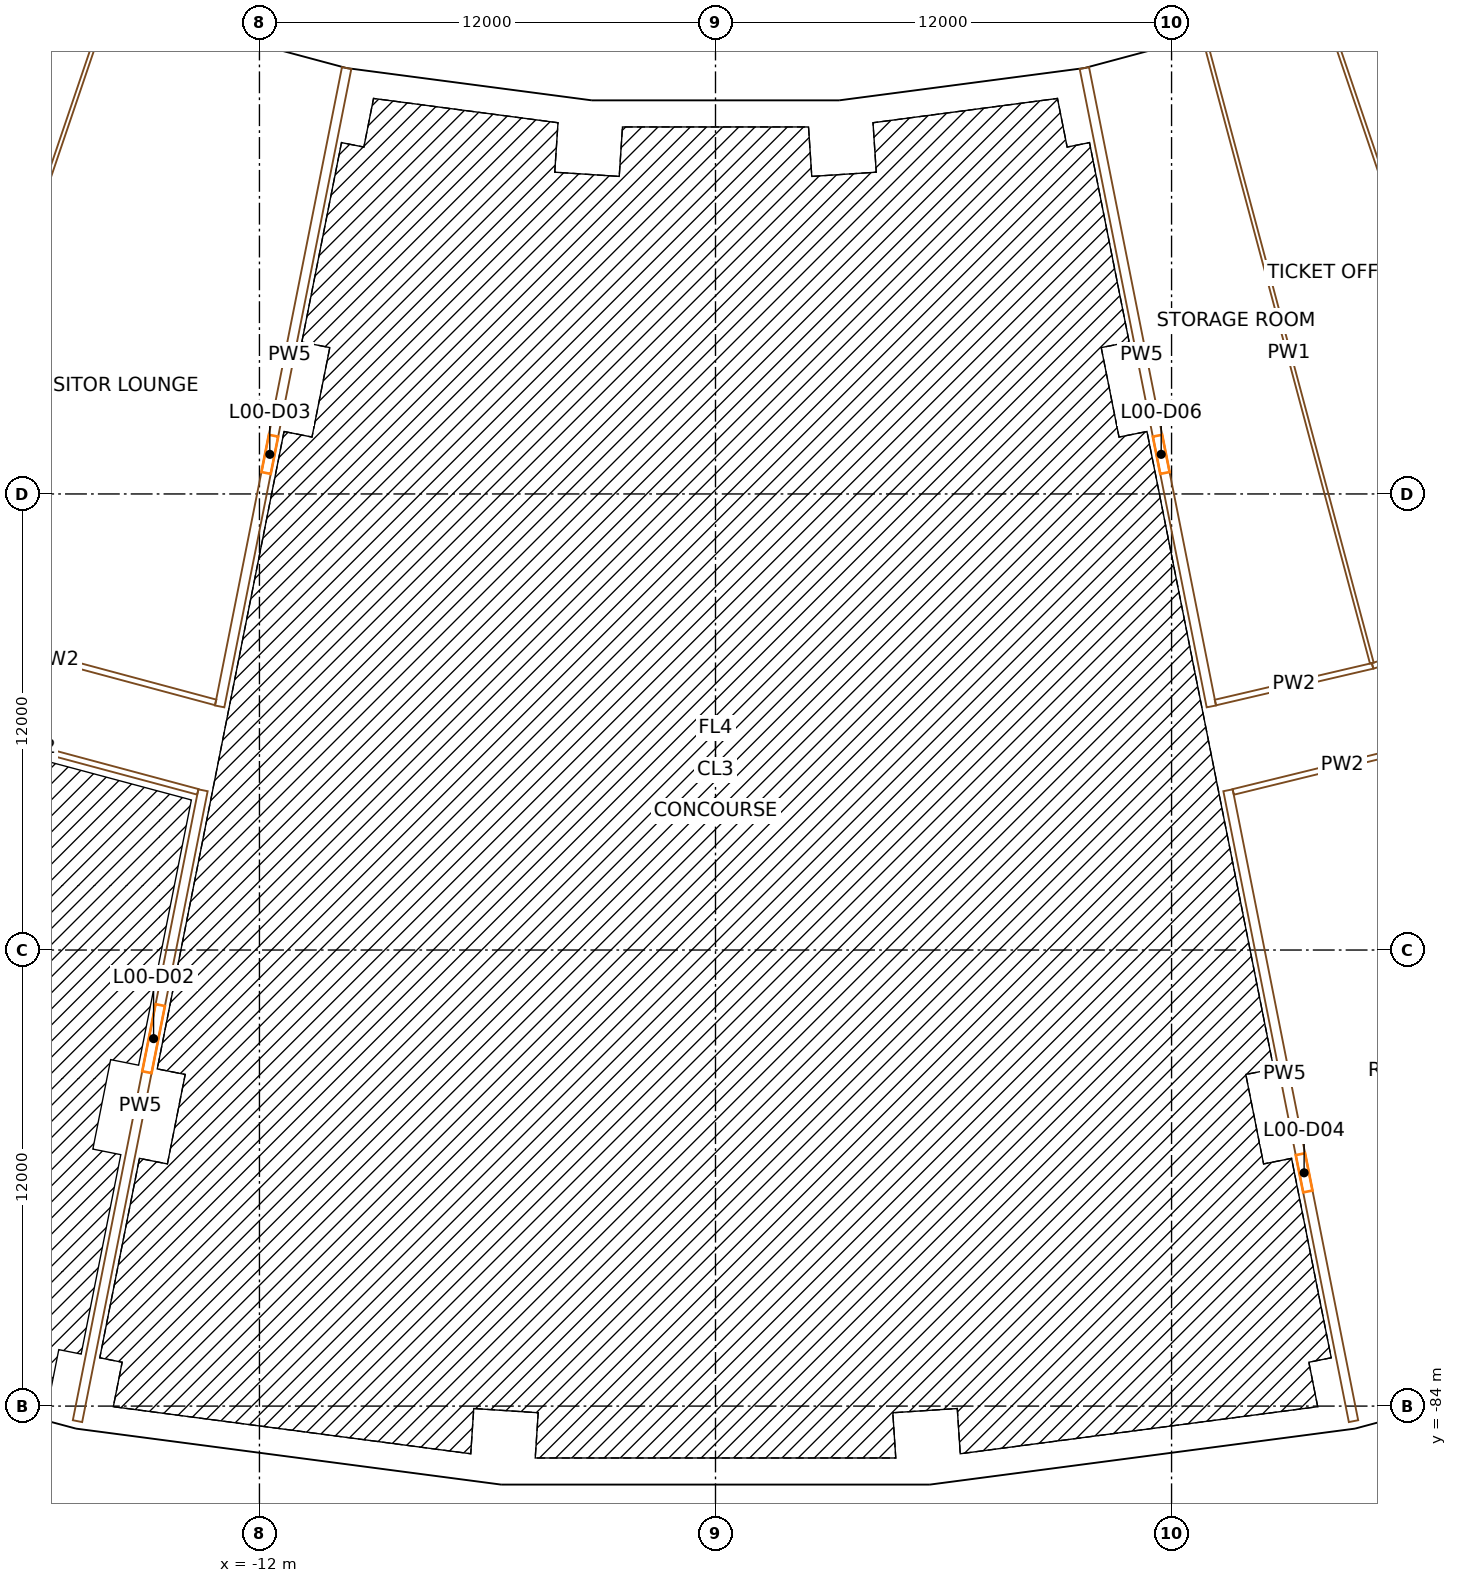
"""IFC4 building model, lengths in metres.
Left out: names, types, materials, properties, quantities, classifications, styles, units other than length and angle.
Written with IfcOpenShell. Run it as: python <this file> out.ifc"""

import sys

from ifc_helpers import new_model, si_unit, direction, frame, frame_2d, origin, origin_2d, place, context, subcontext, project, spatial, rectangle, extrude, element, fill, save


model = new_model("IFC4")
c1 = context("Model", 3, precision=1e-05, world=origin(), true_north=direction((0.0, 1.0)))
c2 = subcontext(c1, "Body", "Model", "MODEL_VIEW")
j1 = project(units=[si_unit("LENGTHUNIT", "METRE"), si_unit("PLANEANGLEUNIT", "RADIAN")], contexts=[c1])
p1 = place(None, origin())
s1 = spatial("IfcSite", under=j1, at=p1, CompositionType="ELEMENT")
p2 = place(p1, origin())
s2 = spatial("IfcBuilding", under=s1, at=p2, CompositionType="ELEMENT")
p3 = place(p2, origin())
s3 = spatial("IfcBuildingStorey", under=s2, at=p3, CompositionType="ELEMENT", Elevation=0.0)
for number, where, z_axis, x_axis in (
    (1, (-16.313, -48.057, -0.4), (0.0, 0.0, 1.0), (0.947, -0.321, 0.0)),
    (2, (-9.901, -49.775, -0.4), (0.0, 0.0, 1.0), (0.981, -0.195, 0.0)),
):
    element("IfcColumn", number, at=place(p3, frame(where, z_axis=z_axis, x_axis=x_axis)), inside=s3, PredefinedType="COLUMN", context=c2, shape_type="SweptSolid", body=[
        extrude(rectangle(XDim=1.1, YDim=1.3, at=origin_2d()), origin(), (0.0, 0.0, 1.0), 9.4),
    ])
for number, where, z_axis, x_axis in (
    (3, (-11.364, -57.131, -0.4), (0.0, 0.0, 1.0), (0.981, -0.195, 0.0)),
    (4, (-15.168, -76.256, -0.4), (0.0, 0.0, 1.0), (0.981, -0.195, 0.0)),
):
    element("IfcColumn", number, at=place(p3, frame(where, z_axis=z_axis, x_axis=x_axis)), inside=s3, PredefinedType="COLUMN", context=c2, shape_type="SweptSolid", body=[
        extrude(rectangle(XDim=1.4, YDim=1.8, at=origin_2d()), origin(), (0.0, 0.0, 1.0), 9.4),
    ])
for number, where, z_axis, x_axis in (
    (5, (-16.631, -83.612, -0.4), (0.0, 0.0, 1.0), (0.981, -0.195, 0.0)),
    (6, (-3.319, -50.641, -0.4), (0.0, 0.0, 1.0), (0.998, -0.065, 0.0)),
):
    element("IfcColumn", number, at=place(p3, frame(where, z_axis=z_axis, x_axis=x_axis)), inside=s3, PredefinedType="COLUMN", context=c2, shape_type="SweptSolid", body=[
        extrude(rectangle(XDim=1.1, YDim=1.3, at=origin_2d()), origin(), (0.0, 0.0, 1.0), 9.4),
    ])
for number, where, z_axis, x_axis in (
    (7, (-3.81, -58.125, -0.4), (0.0, 0.0, 1.0), (0.998, -0.065, 0.0)),
    (8, (-5.085, -77.583, -0.4), (0.0, 0.0, 1.0), (0.998, -0.065, 0.0)),
):
    element("IfcColumn", number, at=place(p3, frame(where, z_axis=z_axis, x_axis=x_axis)), inside=s3, PredefinedType="COLUMN", context=c2, shape_type="SweptSolid", body=[
        extrude(rectangle(XDim=1.4, YDim=1.8, at=origin_2d()), origin(), (0.0, 0.0, 1.0), 9.4),
    ])
for number, where, z_axis, x_axis in (
    (9, (-5.576, -85.067, -0.4), (0.0, 0.0, 1.0), (0.998, -0.065, 0.0)),
    (10, (3.319, -50.641, -0.4), (0.0, 0.0, 1.0), (0.998, 0.065, 0.0)),
):
    element("IfcColumn", number, at=place(p3, frame(where, z_axis=z_axis, x_axis=x_axis)), inside=s3, PredefinedType="COLUMN", context=c2, shape_type="SweptSolid", body=[
        extrude(rectangle(XDim=1.1, YDim=1.3, at=origin_2d()), origin(), (0.0, 0.0, 1.0), 9.4),
    ])
for number, where, z_axis, x_axis in (
    (11, (3.81, -58.125, -0.4), (0.0, 0.0, 1.0), (0.998, 0.065, 0.0)),
    (12, (5.085, -77.583, -0.4), (0.0, 0.0, 1.0), (0.998, 0.065, 0.0)),
):
    element("IfcColumn", number, at=place(p3, frame(where, z_axis=z_axis, x_axis=x_axis)), inside=s3, PredefinedType="COLUMN", context=c2, shape_type="SweptSolid", body=[
        extrude(rectangle(XDim=1.4, YDim=1.8, at=origin_2d()), origin(), (0.0, 0.0, 1.0), 9.4),
    ])
for number, where, z_axis, x_axis in (
    (13, (5.576, -85.067, -0.4), (0.0, 0.0, 1.0), (0.998, 0.065, 0.0)),
    (14, (9.901, -49.775, -0.4), (0.0, 0.0, 1.0), (0.981, 0.195, 0.0)),
):
    element("IfcColumn", number, at=place(p3, frame(where, z_axis=z_axis, x_axis=x_axis)), inside=s3, PredefinedType="COLUMN", context=c2, shape_type="SweptSolid", body=[
        extrude(rectangle(XDim=1.1, YDim=1.3, at=origin_2d()), origin(), (0.0, 0.0, 1.0), 9.4),
    ])
for number, where, z_axis, x_axis in (
    (15, (11.364, -57.131, -0.4), (0.0, 0.0, 1.0), (0.981, 0.195, 0.0)),
    (16, (15.168, -76.256, -0.4), (0.0, 0.0, 1.0), (0.981, 0.195, 0.0)),
):
    element("IfcColumn", number, at=place(p3, frame(where, z_axis=z_axis, x_axis=x_axis)), inside=s3, PredefinedType="COLUMN", context=c2, shape_type="SweptSolid", body=[
        extrude(rectangle(XDim=1.4, YDim=1.8, at=origin_2d()), origin(), (0.0, 0.0, 1.0), 9.4),
    ])
for number, where, z_axis, x_axis in (
    (17, (16.631, -83.612, -0.4), (0.0, 0.0, 1.0), (0.981, 0.195, 0.0)),
    (18, (16.313, -48.057, -0.4), (0.0, 0.0, 1.0), (0.947, 0.321, 0.0)),
):
    element("IfcColumn", number, at=place(p3, frame(where, z_axis=z_axis, x_axis=x_axis)), inside=s3, PredefinedType="COLUMN", context=c2, shape_type="SweptSolid", body=[
        extrude(rectangle(XDim=1.1, YDim=1.3, at=origin_2d()), origin(), (0.0, 0.0, 1.0), 9.4),
    ])
p4 = place(p3, frame((-13.078, -84.935, 0.0), z_axis=(0.0, 0.0, 1.0), x_axis=(0.99144147491, -0.130551912392, 0.0)))
e19 = element("IfcWall", 19, at=p4, inside=s3, PredefinedType="SOLIDWALL", context=c2, shape_type="SweptSolid", body=[
    extrude(rectangle(XDim=3.761, YDim=0.3, at=frame_2d((1.88, 0.0))), origin(), (0.0, 0.0, 1.0), 7.7),
])
p5 = place(p4, frame((0.68, 0.0, 0.0)))
e20 = element("IfcOpeningElement", 20, at=p5, cuts=e19, PredefinedType="OPENING", context=c2, shape_type="SweptSolid", body=[
    extrude(rectangle(XDim=2.4, YDim=3.0, at=frame_2d((1.2, 1.5))), frame((0.0, 0.16, 0.0), z_axis=(0.0, -1.0, 0.0), x_axis=(1.0, 0.0, 0.0)), (0.0, 0.0, 1.0), 0.32),
])
p6 = place(p3, frame((-1.88, -85.915, 0.0), z_axis=(0.0, 0.0, 1.0), x_axis=(1.0, 0.0, 0.0)))
e21 = element("IfcWall", 21, at=p6, inside=s3, PredefinedType="SOLIDWALL", context=c2, shape_type="SweptSolid", body=[
    extrude(rectangle(XDim=3.761, YDim=0.3, at=frame_2d((1.88, 0.0))), origin(), (0.0, 0.0, 1.0), 7.7),
])
p7 = place(p6, frame((0.68, 0.0, 0.0)))
e22 = element("IfcOpeningElement", 22, at=p7, cuts=e21, PredefinedType="OPENING", context=c2, shape_type="SweptSolid", body=[
    extrude(rectangle(XDim=2.4, YDim=3.0, at=frame_2d((1.2, 1.5))), frame((0.0, 0.16, 0.0), z_axis=(0.0, -1.0, 0.0), x_axis=(1.0, 0.0, 0.0)), (0.0, 0.0, 1.0), 0.32),
])
p8 = place(p3, frame((9.35, -85.426, 0.0), z_axis=(0.0, 0.0, 1.0), x_axis=(0.99144147491, 0.130551912392, 0.0)))
e23 = element("IfcWall", 23, at=p8, inside=s3, PredefinedType="SOLIDWALL", context=c2, shape_type="SweptSolid", body=[
    extrude(rectangle(XDim=3.761, YDim=0.3, at=frame_2d((1.88, 0.0))), origin(), (0.0, 0.0, 1.0), 7.7),
])
p9 = place(p8, frame((0.68, 0.0, 0.0)))
e24 = element("IfcOpeningElement", 24, at=p9, cuts=e23, PredefinedType="OPENING", context=c2, shape_type="SweptSolid", body=[
    extrude(rectangle(XDim=2.4, YDim=3.0, at=frame_2d((1.2, 1.5))), frame((0.0, 0.16, 0.0), z_axis=(0.0, -1.0, 0.0), x_axis=(1.0, 0.0, 0.0)), (0.0, 0.0, 1.0), 0.32),
])
p10 = place(p3, frame((-7.575, -49.226, 0.0), z_axis=(0.0, 0.0, 1.0), x_axis=(0.991440882539, -0.130556410914, 0.0)))
e25 = element("IfcWall", 25, at=p10, inside=s3, PredefinedType="SOLIDWALL", context=c2, shape_type="SweptSolid", body=[
    extrude(rectangle(XDim=2.169, YDim=0.3, at=frame_2d((1.084, 0.0))), origin(), (0.0, 0.0, 1.0), 7.7),
])
p11 = place(p10, frame((0.285, 0.0, 0.0)))
e26 = element("IfcOpeningElement", 26, at=p11, cuts=e25, PredefinedType="OPENING", context=c2, shape_type="SweptSolid", body=[
    extrude(rectangle(XDim=1.6, YDim=3.0, at=frame_2d((0.8, 1.5))), frame((0.0, 0.16, 0.0), z_axis=(0.0, -1.0, 0.0), x_axis=(1.0, 0.0, 0.0)), (0.0, 0.0, 1.0), 0.32),
])
p12 = place(p3, frame((-1.085, -49.793, 0.0), z_axis=(0.0, 0.0, 1.0), x_axis=(1.0, 0.0, 0.0)))
e27 = element("IfcWall", 27, at=p12, inside=s3, PredefinedType="SOLIDWALL", context=c2, shape_type="SweptSolid", body=[
    extrude(rectangle(XDim=2.169, YDim=0.3, at=frame_2d((1.085, 0.0))), origin(), (0.0, 0.0, 1.0), 7.7),
])
p13 = place(p12, frame((0.285, 0.0, 0.0)))
e28 = element("IfcOpeningElement", 28, at=p13, cuts=e27, PredefinedType="OPENING", context=c2, shape_type="SweptSolid", body=[
    extrude(rectangle(XDim=1.6, YDim=3.0, at=frame_2d((0.8, 1.5))), frame((0.0, 0.16, 0.0), z_axis=(0.0, -1.0, 0.0), x_axis=(1.0, 0.0, 0.0)), (0.0, 0.0, 1.0), 0.32),
])
p14 = place(p3, frame((5.424, -49.509, 0.0), z_axis=(0.0, 0.0, 1.0), x_axis=(0.991440882539, 0.130556410914, 0.0)))
e29 = element("IfcWall", 29, at=p14, inside=s3, PredefinedType="SOLIDWALL", context=c2, shape_type="SweptSolid", body=[
    extrude(rectangle(XDim=2.169, YDim=0.3, at=frame_2d((1.084, 0.0))), origin(), (0.0, 0.0, 1.0), 7.7),
])
p15 = place(p14, frame((0.285, 0.0, 0.0)))
e30 = element("IfcOpeningElement", 30, at=p15, cuts=e29, PredefinedType="OPENING", context=c2, shape_type="SweptSolid", body=[
    extrude(rectangle(XDim=1.6, YDim=3.0, at=frame_2d((0.8, 1.5))), frame((0.0, 0.16, 0.0), z_axis=(0.0, -1.0, 0.0), x_axis=(1.0, 0.0, 0.0)), (0.0, 0.0, 1.0), 0.32),
])
p16 = place(p3, frame((-22.244, -65.528, 0.0), z_axis=(0.0, 0.0, 1.0), x_axis=(0.965928763412, -0.258808083362, 0.0)))
e31 = element("IfcWall", 31, at=p16, inside=s3, PredefinedType="PARTITIONING", context=c2, shape_type="SweptSolid", body=[
    extrude(rectangle(XDim=8.927, YDim=0.15, at=frame_2d((4.463, 0.0))), origin(), (0.0, 0.0, 1.0), 7.6),
])
p17 = place(p3, frame((-21.472, -63.255, 0.0), z_axis=(0.0, 0.0, 1.0), x_axis=(0.96592325157, -0.258828653894, 0.0)))
e32 = element("IfcWall", 32, at=p17, inside=s3, PredefinedType="PARTITIONING", context=c2, shape_type="SweptSolid", body=[
    extrude(rectangle(XDim=8.613, YDim=0.15, at=frame_2d((4.306, 0.0))), origin(), (0.0, 0.0, 1.0), 7.6),
])
p18 = place(p3, frame((-16.136, -47.536, 0.0), z_axis=(0.0, 0.0, 1.0), x_axis=(-0.321439713462, -0.946930045256, 0.0)))
e33 = element("IfcWall", 33, at=p18, inside=s3, PredefinedType="PARTITIONING", context=c2, shape_type="SweptSolid", body=[
    extrude(rectangle(XDim=16.525, YDim=0.1, at=frame_2d((8.262, 0.0))), origin(), (0.0, 0.0, 1.0), 7.6),
])
p19 = place(p3, frame((-16.787, -84.396, 0.0), z_axis=(0.0, 0.0, 1.0), x_axis=(0.195086842272, 0.980785972561, 0.0)))
e34 = element("IfcWall", 34, at=p19, inside=s3, PredefinedType="PARTITIONING", context=c2, shape_type="SweptSolid", body=[
    extrude(rectangle(XDim=16.925, YDim=0.25, at=frame_2d((8.462, 0.0))), origin(), (0.0, 0.0, 1.0), 7.6),
])
p20 = place(p19, frame((9.362, 0.0, 0.0)))
e35 = element("IfcOpeningElement", 35, at=p20, cuts=e34, PredefinedType="OPENING", context=c2, shape_type="SweptSolid", body=[
    extrude(rectangle(XDim=1.8, YDim=2.1, at=frame_2d((0.9, 1.05))), frame((0.0, 0.135, 0.0), z_axis=(0.0, -1.0, 0.0), x_axis=(1.0, 0.0, 0.0)), (0.0, 0.0, 1.0), 0.27),
])
p21 = place(p3, frame((-13.047, -65.59, 0.0), z_axis=(0.0, 0.0, 1.0), x_axis=(0.195085176221, 0.980786303952, 0.0)))
e36 = element("IfcWall", 36, at=p21, inside=s3, PredefinedType="PARTITIONING", context=c2, shape_type="SweptSolid", body=[
    extrude(rectangle(XDim=17.125, YDim=0.25, at=frame_2d((8.562, 0.0))), origin(), (0.0, 0.0, 1.0), 7.6),
])
p22 = place(p21, frame((6.262, 0.0, 0.0)))
e37 = element("IfcOpeningElement", 37, at=p22, cuts=e36, PredefinedType="OPENING", context=c2, shape_type="SweptSolid", body=[
    extrude(rectangle(XDim=1.0, YDim=2.1, at=frame_2d((0.5, 1.05))), frame((0.0, 0.135, 0.0), z_axis=(0.0, -1.0, 0.0), x_axis=(1.0, 0.0, 0.0)), (0.0, 0.0, 1.0), 0.27),
])
p23 = place(p3, frame((9.706, -48.794, 0.0), z_axis=(0.0, 0.0, 1.0), x_axis=(0.195085176221, -0.980786303952, 0.0)))
e38 = element("IfcWall", 38, at=p23, inside=s3, PredefinedType="PARTITIONING", context=c2, shape_type="SweptSolid", body=[
    extrude(rectangle(XDim=17.125, YDim=0.25, at=frame_2d((8.562, 0.0))), origin(), (0.0, 0.0, 1.0), 7.6),
])
p24 = place(p23, frame((9.863, 0.0, 0.0)))
e39 = element("IfcOpeningElement", 39, at=p24, cuts=e38, PredefinedType="OPENING", context=c2, shape_type="SweptSolid", body=[
    extrude(rectangle(XDim=1.0, YDim=2.1, at=frame_2d((0.5, 1.05))), frame((0.0, 0.135, 0.0), z_axis=(0.0, -1.0, 0.0), x_axis=(1.0, 0.0, 0.0)), (0.0, 0.0, 1.0), 0.27),
])
p25 = place(p3, frame((12.9, -48.145, 0.0), z_axis=(0.0, 0.0, 1.0), x_axis=(0.258824516405, -0.965924360241, 0.0)))
e40 = element("IfcWall", 40, at=p25, inside=s3, PredefinedType="PARTITIONING", context=c2, shape_type="SweptSolid", body=[
    extrude(rectangle(XDim=16.882, YDim=0.1, at=frame_2d((8.441, 0.0))), origin(), (0.0, 0.0, 1.0), 7.6),
])
p26 = place(p3, frame((13.154, -65.488, 0.0), z_axis=(0.0, 0.0, 1.0), x_axis=(0.973881908434, 0.227055121998, 0.0)))
e41 = element("IfcWall", 41, at=p26, inside=s3, PredefinedType="PARTITIONING", context=c2, shape_type="SweptSolid", body=[
    extrude(rectangle(XDim=4.246, YDim=0.15, at=frame_2d((2.123, 0.0))), origin(), (0.0, 0.0, 1.0), 7.6),
])
p27 = place(p3, frame((13.486, -67.797, 0.0), z_axis=(0.0, 0.0, 1.0), x_axis=(0.195086842272, -0.980785972561, 0.0)))
e42 = element("IfcWall", 42, at=p27, inside=s3, PredefinedType="PARTITIONING", context=c2, shape_type="SweptSolid", body=[
    extrude(rectangle(XDim=16.925, YDim=0.25, at=frame_2d((8.462, 0.0))), origin(), (0.0, 0.0, 1.0), 7.6),
])
p28 = place(p27, frame((9.762, 0.0, 0.0)))
e43 = element("IfcOpeningElement", 43, at=p28, cuts=e42, PredefinedType="OPENING", context=c2, shape_type="SweptSolid", body=[
    extrude(rectangle(XDim=1.0, YDim=2.1, at=frame_2d((0.5, 1.05))), frame((0.0, 0.135, 0.0), z_axis=(0.0, -1.0, 0.0), x_axis=(1.0, 0.0, 0.0)), (0.0, 0.0, 1.0), 0.27),
])
p29 = place(p3, frame((13.622, -67.841, 0.0), z_axis=(0.0, 0.0, 1.0), x_axis=(0.971337396257, 0.237704990762, 0.0)))
e44 = element("IfcWall", 44, at=p29, inside=s3, PredefinedType="PARTITIONING", context=c2, shape_type="SweptSolid", body=[
    extrude(rectangle(XDim=5.914, YDim=0.15, at=frame_2d((2.957, 0.0))), origin(), (0.0, 0.0, 1.0), 7.6),
])
p30 = place(p3, frame((16.136, -47.536, 0.0), z_axis=(0.0, 0.0, 1.0), x_axis=(0.321439713462, -0.946930045256, 0.0)))
e45 = element("IfcWall", 45, at=p30, inside=s3, PredefinedType="PARTITIONING", context=c2, shape_type="SweptSolid", body=[
    extrude(rectangle(XDim=16.525, YDim=0.1, at=frame_2d((8.262, 0.0))), origin(), (0.0, 0.0, 1.0), 7.6),
])
p31 = place(p3, frame((17.289, -64.524, 0.0), z_axis=(0.0, 0.0, 1.0), x_axis=(0.956933231095, 0.290308097072, 0.0)))
e46 = element("IfcWall", 46, at=p31, inside=s3, PredefinedType="PARTITIONING", context=c2, shape_type="SweptSolid", body=[
    extrude(rectangle(XDim=4.371, YDim=0.15, at=frame_2d((2.186, 0.0))), origin(), (0.0, 0.0, 1.0), 7.6),
])
p32 = place(p31, frame((1.686, 0.0, 0.0)))
e47 = element("IfcOpeningElement", 47, at=p32, cuts=e46, PredefinedType="OPENING", context=c2, shape_type="SweptSolid", body=[
    extrude(rectangle(XDim=1.0, YDim=2.1, at=frame_2d((0.5, 1.05))), frame((0.0, 0.085, 0.0), z_axis=(0.0, -1.0, 0.0), x_axis=(1.0, 0.0, 0.0)), (0.0, 0.0, 1.0), 0.17),
])
p33 = place(p5, origin())
e48 = element("IfcDoor", 48, at=p33, inside=s3, OperationType="DOUBLE_DOOR_DOUBLE_SWING", PredefinedType="DOOR", context=c2, shape_type="SweptSolid", body=[
    extrude(rectangle(XDim=2.4, YDim=3.0, at=frame_2d((1.2, 1.5))), frame((0.0, 0.025, 0.0), z_axis=(0.0, -1.0, 0.0), x_axis=(1.0, 0.0, 0.0)), (0.0, 0.0, 1.0), 0.05),
])
fill(e20, e48)
p34 = place(p7, origin())
e49 = element("IfcDoor", 49, at=p34, inside=s3, OperationType="DOUBLE_DOOR_DOUBLE_SWING", PredefinedType="DOOR", context=c2, shape_type="SweptSolid", body=[
    extrude(rectangle(XDim=2.4, YDim=3.0, at=frame_2d((1.2, 1.5))), frame((0.0, 0.025, 0.0), z_axis=(0.0, -1.0, 0.0), x_axis=(1.0, 0.0, 0.0)), (0.0, 0.0, 1.0), 0.05),
])
fill(e22, e49)
p35 = place(p9, origin())
e50 = element("IfcDoor", 50, at=p35, inside=s3, OperationType="DOUBLE_DOOR_DOUBLE_SWING", PredefinedType="DOOR", context=c2, shape_type="SweptSolid", body=[
    extrude(rectangle(XDim=2.4, YDim=3.0, at=frame_2d((1.2, 1.5))), frame((0.0, 0.025, 0.0), z_axis=(0.0, -1.0, 0.0), x_axis=(1.0, 0.0, 0.0)), (0.0, 0.0, 1.0), 0.05),
])
fill(e24, e50)
p36 = place(p11, origin())
e51 = element("IfcDoor", 51, at=p36, inside=s3, OperationType="DOUBLE_DOOR_DOUBLE_SWING", PredefinedType="DOOR", context=c2, shape_type="SweptSolid", body=[
    extrude(rectangle(XDim=1.6, YDim=3.0, at=frame_2d((0.8, 1.5))), frame((0.0, 0.025, 0.0), z_axis=(0.0, -1.0, 0.0), x_axis=(1.0, 0.0, 0.0)), (0.0, 0.0, 1.0), 0.05),
])
fill(e26, e51)
p37 = place(p13, origin())
e52 = element("IfcDoor", 52, at=p37, inside=s3, OperationType="DOUBLE_DOOR_DOUBLE_SWING", PredefinedType="DOOR", context=c2, shape_type="SweptSolid", body=[
    extrude(rectangle(XDim=1.6, YDim=3.0, at=frame_2d((0.8, 1.5))), frame((0.0, 0.025, 0.0), z_axis=(0.0, -1.0, 0.0), x_axis=(1.0, 0.0, 0.0)), (0.0, 0.0, 1.0), 0.05),
])
fill(e28, e52)
p38 = place(p15, origin())
e53 = element("IfcDoor", 53, at=p38, inside=s3, OperationType="DOUBLE_DOOR_DOUBLE_SWING", PredefinedType="DOOR", context=c2, shape_type="SweptSolid", body=[
    extrude(rectangle(XDim=1.6, YDim=3.0, at=frame_2d((0.8, 1.5))), frame((0.0, 0.025, 0.0), z_axis=(0.0, -1.0, 0.0), x_axis=(1.0, 0.0, 0.0)), (0.0, 0.0, 1.0), 0.05),
])
fill(e30, e53)
p39 = place(p20, origin())
e54 = element("IfcDoor", 54, at=p39, inside=s3, OperationType="DOUBLE_DOOR_SINGLE_SWING", PredefinedType="DOOR", context=c2, shape_type="SweptSolid", body=[
    extrude(rectangle(XDim=1.8, YDim=2.1, at=frame_2d((0.9, 1.05))), frame((0.0, 0.025, 0.0), z_axis=(0.0, -1.0, 0.0), x_axis=(1.0, 0.0, 0.0)), (0.0, 0.0, 1.0), 0.05),
])
fill(e35, e54)
p40 = place(p22, origin())
e55 = element("IfcDoor", 55, at=p40, inside=s3, OperationType="SINGLE_SWING_LEFT", PredefinedType="DOOR", context=c2, shape_type="SweptSolid", body=[
    extrude(rectangle(XDim=1.0, YDim=2.1, at=frame_2d((0.5, 1.05))), frame((0.0, 0.025, 0.0), z_axis=(0.0, -1.0, 0.0), x_axis=(1.0, 0.0, 0.0)), (0.0, 0.0, 1.0), 0.05),
])
fill(e37, e55)
p41 = place(p28, origin())
e56 = element("IfcDoor", 56, at=p41, inside=s3, OperationType="SINGLE_SWING_RIGHT", PredefinedType="DOOR", context=c2, shape_type="SweptSolid", body=[
    extrude(rectangle(XDim=1.0, YDim=2.1, at=frame_2d((0.5, 1.05))), frame((0.0, 0.025, 0.0), z_axis=(0.0, -1.0, 0.0), x_axis=(1.0, 0.0, 0.0)), (0.0, 0.0, 1.0), 0.05),
])
fill(e43, e56)
p42 = place(p24, origin())
e57 = element("IfcDoor", 57, at=p42, inside=s3, OperationType="SINGLE_SWING_RIGHT", PredefinedType="DOOR", context=c2, shape_type="SweptSolid", body=[
    extrude(rectangle(XDim=1.0, YDim=2.1, at=frame_2d((0.5, 1.05))), frame((0.0, 0.025, 0.0), z_axis=(0.0, -1.0, 0.0), x_axis=(1.0, 0.0, 0.0)), (0.0, 0.0, 1.0), 0.05),
])
fill(e39, e57)
save(model, sys.argv[1])
